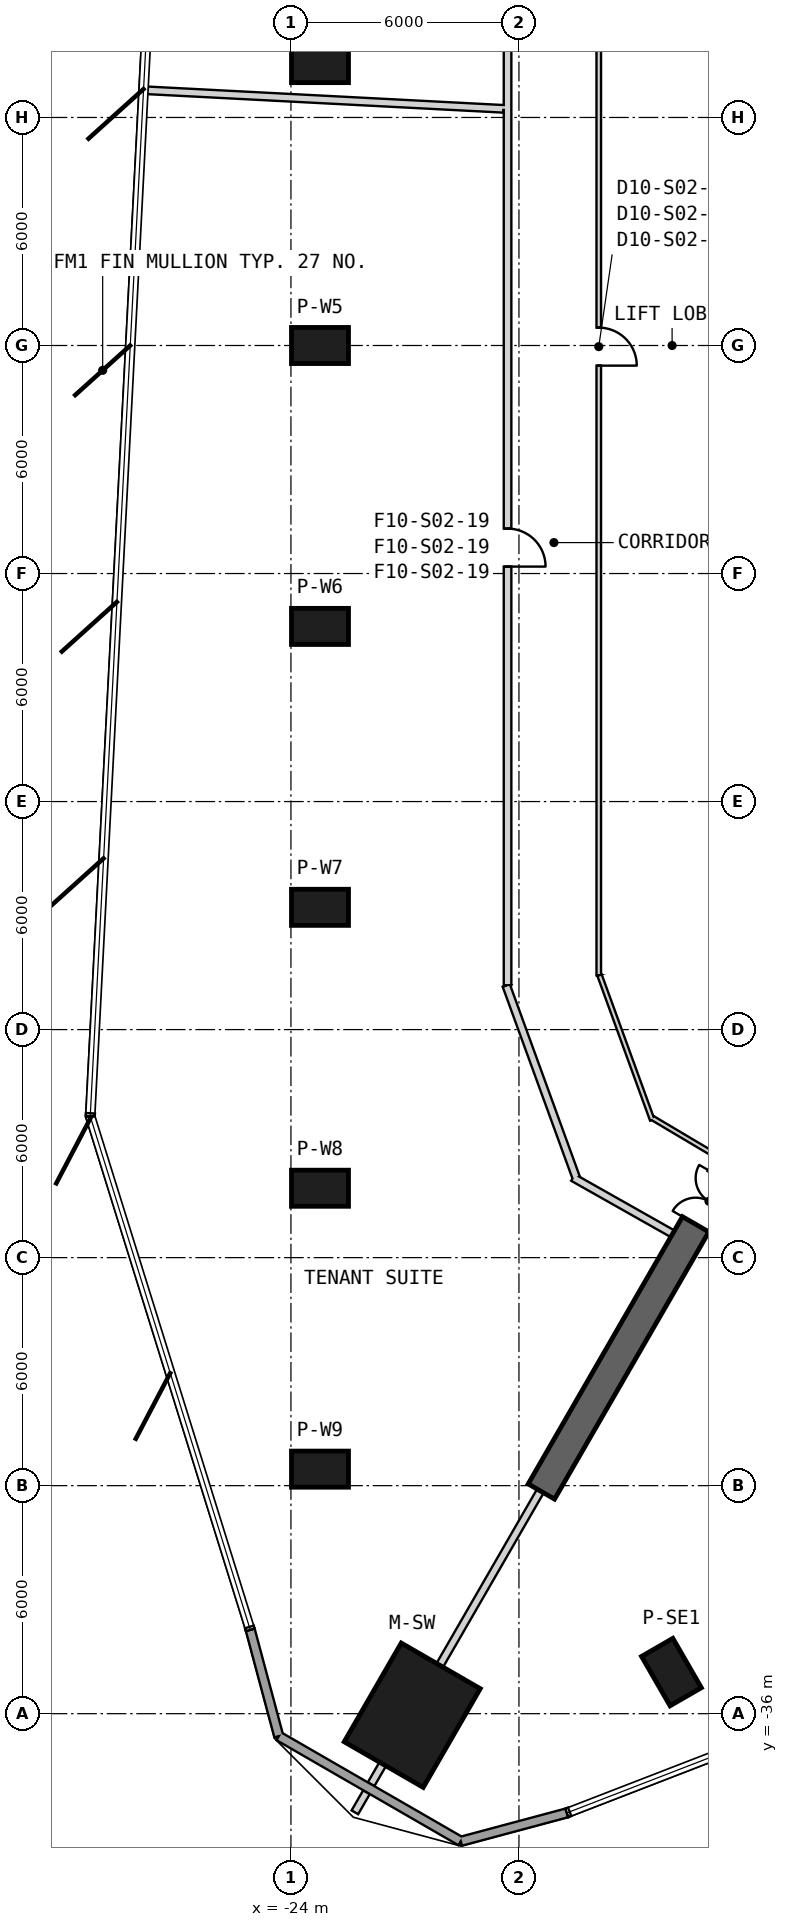
"""IFC4 building model, lengths in metres.
Left out: names, types, materials, properties, quantities, classifications, styles, units other than length and angle.
Written with IfcOpenShell. Run it as: python <this file> out.ifc"""

import sys

from ifc_helpers import new_model, si_unit, direction, frame, frame_2d, origin, origin_2d, place, context, subcontext, project, spatial, rectangle, extrude, element, fill, save


model = new_model("IFC4")
c1 = context("Model", 3, precision=1e-05, world=origin(), true_north=direction((0.0, 1.0)))
c2 = subcontext(c1, "Body", "Model", "MODEL_VIEW")
j1 = project(units=[si_unit("LENGTHUNIT", "METRE"), si_unit("PLANEANGLEUNIT", "RADIAN")], contexts=[c1])
p1 = place(None, origin())
s1 = spatial("IfcSite", under=j1, at=p1, CompositionType="ELEMENT")
p2 = place(p1, origin())
s2 = spatial("IfcBuilding", under=s1, at=p2, CompositionType="ELEMENT")
p3 = place(p2, frame((0.0, 0.0, 70.1)))
s3 = spatial("IfcBuildingStorey", under=s2, at=p3, CompositionType="ELEMENT", Elevation=70.1)
p4 = place(p3, frame((-20.808, -36.041, 0.0), z_axis=(0.0, 0.0, 1.0), x_axis=(-0.5, -0.866025403784, 0.0)))
e1 = element("IfcColumn", 1, at=p4, inside=s3, PredefinedType="COLUMN", context=c2, shape_type="SweptSolid", body=[
    extrude(rectangle(XDim=3.0, YDim=2.4, at=origin_2d()), origin(), (0.0, 0.0, 1.0), 4.1),
])
for number, where, z_axis, x_axis in (
    (2, (-23.236, 7.391, 0.0), (0.0, 0.0, 1.0), (-1.0, 0.0, 0.0)),
    (3, (-23.236, 0.0, 0.0), (0.0, 0.0, 1.0), (-1.0, 0.0, 0.0)),
    (4, (-23.236, -7.391, 0.0), (0.0, 0.0, 1.0), (-1.0, 0.0, 0.0)),
    (5, (-23.236, -14.783, 0.0), (0.0, 0.0, 1.0), (-1.0, 0.0, 0.0)),
    (6, (-23.236, -22.174, 0.0), (0.0, 0.0, 1.0), (-1.0, 0.0, 0.0)),
    (7, (-23.236, -29.566, 0.0), (0.0, 0.0, 1.0), (-1.0, 0.0, 0.0)),
    (8, (-13.987, -34.906, 0.0), (0.0, 0.0, 1.0), (0.5, -0.866, 0.0)),
):
    element("IfcColumn", number, at=place(p3, frame(where, z_axis=z_axis, x_axis=x_axis)), inside=s3, PredefinedType="COLUMN", context=c2, shape_type="SweptSolid", body=[
        extrude(rectangle(XDim=1.5, YDim=0.95, at=origin_2d()), origin(), (0.0, 0.0, 1.0), 4.1),
    ])
p5 = place(p3, frame((-10.575, -18.316, 0.0), z_axis=(0.0, 0.0, 1.0), x_axis=(-0.499998162141, -0.86602646487, 0.0)))
e9 = element("IfcWall", 9, at=p5, inside=s3, PredefinedType="SHEAR", context=c2, shape_type="SweptSolid", body=[
    extrude(rectangle(XDim=13.669, YDim=0.8, at=frame_2d((6.835, 0.0))), origin(), (0.0, 0.0, 1.0), 4.1),
])
p6 = place(p5, frame((4.15, 0.0, 0.0)))
e10 = element("IfcOpeningElement", 10, at=p6, cuts=e9, PredefinedType="OPENING", context=c2, shape_type="SweptSolid", body=[
    extrude(rectangle(XDim=1.4, YDim=2.4, at=frame_2d((0.7, 1.2))), frame((0.0, 0.41, 0.0), z_axis=(0.0, -1.0, 0.0), x_axis=(1.0, 0.0, 0.0)), (0.0, 0.0, 1.0), 0.82),
])
p7 = place(p3, frame((-25.07, -33.794, 0.0), z_axis=(0.0, 0.0, 1.0), x_axis=(0.258837161991, -0.965920971701, 0.0)))
e11 = element("IfcWall", 11, at=p7, inside=s3, PredefinedType="SOLIDWALL", context=c2, shape_type="SweptSolid", body=[
    extrude(rectangle(XDim=2.897, YDim=0.24, at=frame_2d((1.449, 0.0))), origin(), (0.0, 0.0, 1.0), 3.8),
])
p8 = place(p3, frame((-24.32, -36.593, 0.0), z_axis=(0.0, 0.0, 1.0), x_axis=(0.866017993231, -0.500012835235, 0.0)))
e12 = element("IfcWall", 12, at=p8, inside=s3, PredefinedType="SOLIDWALL", context=c2, shape_type="SweptSolid", body=[
    extrude(rectangle(XDim=5.531, YDim=0.24, at=frame_2d((2.766, 0.0))), origin(), (0.0, 0.0, 1.0), 3.8),
])
p9 = place(p3, frame((-19.53, -39.359, 0.0), z_axis=(0.0, 0.0, 1.0), x_axis=(0.965912964575, 0.258867040904, 0.0)))
e13 = element("IfcWall", 13, at=p9, inside=s3, PredefinedType="SOLIDWALL", context=c2, shape_type="SweptSolid", body=[
    extrude(rectangle(XDim=2.889, YDim=0.24, at=frame_2d((1.444, 0.0))), origin(), (0.0, 0.0, 1.0), 3.8),
])
p10 = place(p3, frame((-15.9, 16.451, 0.0), z_axis=(0.0, 0.0, 1.0), x_axis=(0.0, -1.0, 0.0)))
e14 = element("IfcWall", 14, at=p10, inside=s3, PredefinedType="PARTITIONING", context=c2, shape_type="SweptSolid", body=[
    extrude(rectangle(XDim=33.022, YDim=0.12, at=frame_2d((16.511, 0.0))), origin(), (0.0, 0.0, 1.0), 2.98),
])
p11 = place(p10, frame((15.981, 0.0, 0.0)))
e15 = element("IfcOpeningElement", 15, at=p11, cuts=e14, PredefinedType="OPENING", context=c2, shape_type="SweptSolid", body=[
    extrude(rectangle(XDim=1.0, YDim=2.1, at=frame_2d((0.5, 1.05))), frame((0.0, 0.07, 0.0), z_axis=(0.0, -1.0, 0.0), x_axis=(1.0, 0.0, 0.0)), (0.0, 0.0, 1.0), 0.14),
])
p12 = place(p3, frame((-15.879, -16.567, 0.0), z_axis=(0.0, 0.0, 1.0), x_axis=(0.341999322503, -0.939700198685, 0.0)))
e16 = element("IfcWall", 16, at=p12, inside=s3, PredefinedType="PARTITIONING", context=c2, shape_type="SweptSolid", body=[
    extrude(rectangle(XDim=4.054, YDim=0.12, at=frame_2d((2.027, 0.0))), origin(), (0.0, 0.0, 1.0), 2.88),
])
p13 = place(p3, frame((-14.494, -20.322, 0.0), z_axis=(0.0, 0.0, 1.0), x_axis=(0.859745408261, -0.510722853389, 0.0)))
e17 = element("IfcWall", 17, at=p13, inside=s3, PredefinedType="PARTITIONING", context=c2, shape_type="SweptSolid", body=[
    extrude(rectangle(XDim=1.991, YDim=0.12, at=frame_2d((0.996, 0.0))), origin(), (0.0, 0.0, 1.0), 3.8),
])
p14 = place(p3, frame((-16.576, -21.892, 0.0), z_axis=(0.0, 0.0, 1.0), x_axis=(0.870559817111, -0.492062602553, 0.0)))
e18 = element("IfcWall", 18, at=p14, inside=s3, PredefinedType="PARTITIONING", context=c2, shape_type="SweptSolid", body=[
    extrude(rectangle(XDim=3.01, YDim=0.2, at=frame_2d((1.505, 0.0))), origin(), (0.0, 0.0, 1.0), 3.8),
])
p15 = place(p3, frame((-18.334, -16.84, 0.0), z_axis=(0.0, 0.0, 1.0), x_axis=(0.342015877493, -0.939694173411, 0.0)))
e19 = element("IfcWall", 19, at=p15, inside=s3, PredefinedType="PARTITIONING", context=c2, shape_type="SweptSolid", body=[
    extrude(rectangle(XDim=5.389, YDim=0.2, at=frame_2d((2.694, 0.0))), origin(), (0.0, 0.0, 1.0), 2.88),
])
p16 = place(p3, frame((-18.3, 17.034, 0.0), z_axis=(0.0, 0.0, 1.0), x_axis=(0.0, -1.0, 0.0)))
e20 = element("IfcWall", 20, at=p16, inside=s3, PredefinedType="PARTITIONING", context=c2, shape_type="SweptSolid", body=[
    extrude(rectangle(XDim=10.835, YDim=0.2, at=frame_2d((5.417, 0.0))), origin(), (0.0, 0.0, 1.0), 3.08),
])
p17 = place(p16, frame((4.956, 0.0, 0.0)))
e21 = element("IfcOpeningElement", 21, at=p17, cuts=e20, PredefinedType="OPENING", context=c2, shape_type="SweptSolid", body=[
    extrude(rectangle(XDim=1.0, YDim=2.1, at=frame_2d((0.5, 1.05))), frame((0.0, 0.11, 0.0), z_axis=(0.0, -1.0, 0.0), x_axis=(1.0, 0.0, 0.0)), (0.0, 0.0, 1.0), 0.22),
])
p18 = place(p3, frame((-18.3, 6.199, 0.0), z_axis=(0.0, 0.0, 1.0), x_axis=(0.0, -1.0, 0.0)))
e22 = element("IfcWall", 22, at=p18, inside=s3, PredefinedType="PARTITIONING", context=c2, shape_type="SweptSolid", body=[
    extrude(rectangle(XDim=23.033, YDim=0.2, at=frame_2d((11.517, 0.0))), origin(), (0.0, 0.0, 1.0), 3.08),
])
p19 = place(p18, frame((11.017, 0.0, 0.0)))
e23 = element("IfcOpeningElement", 23, at=p19, cuts=e22, PredefinedType="OPENING", context=c2, shape_type="SweptSolid", body=[
    extrude(rectangle(XDim=1.0, YDim=2.1, at=frame_2d((0.5, 1.05))), frame((0.0, 0.11, 0.0), z_axis=(0.0, -1.0, 0.0), x_axis=(1.0, 0.0, 0.0)), (0.0, 0.0, 1.0), 0.22),
])
p20 = place(p3, frame((-18.4, 6.227, 0.0), z_axis=(0.0, 0.0, 1.0), x_axis=(-0.998654739652, 0.051852781702, 0.0)))
e24 = element("IfcWall", 24, at=p20, inside=s3, PredefinedType="PARTITIONING", context=c2, shape_type="SweptSolid", body=[
    extrude(rectangle(XDim=9.492, YDim=0.2, at=frame_2d((4.746, 0.0))), origin(), (0.0, 0.0, 1.0), 3.08),
])
p21 = place(p3, frame((-22.318, -38.596, 0.0), z_axis=(0.0, 0.0, 1.0), x_axis=(0.500078582497, 0.865980029404, 0.0)))
e25 = element("IfcWall", 25, at=p21, inside=s3, PredefinedType="PARTITIONING", context=c2, shape_type="SweptSolid", body=[
    extrude(rectangle(XDim=0.613, YDim=0.2, at=frame_2d((0.307, 0.0))), origin(), (0.0, 0.0, 1.0), 3.8),
])
p22 = place(p3, frame((-21.891, -37.857, 0.0), z_axis=(0.0, 0.0, 1.0), x_axis=(0.49994015576, 0.866059952115, 0.0)))
e26 = element("IfcWall", 26, at=p22, inside=s3, PredefinedType="PARTITIONING", context=c2, shape_type="SweptSolid", body=[
    extrude(rectangle(XDim=0.615, YDim=0.2, at=frame_2d((0.307, 0.0))), origin(), (0.0, 0.0, 1.0), 3.8),
])
p23 = place(p3, frame((-20.084, -34.727, 0.0), z_axis=(0.0, 0.0, 1.0), x_axis=(0.499991120112, 0.86603053053, 0.0)))
e27 = element("IfcWall", 27, at=p23, inside=s3, PredefinedType="PARTITIONING", context=c2, shape_type="SweptSolid", body=[
    extrude(rectangle(XDim=5.296, YDim=0.2, at=frame_2d((2.648, 0.0))), origin(), (0.0, 0.0, 1.0), 3.37),
])
p24 = place(p11, origin())
e28 = element("IfcDoor", 28, at=p24, inside=s3, OperationType="SINGLE_SWING_RIGHT", PredefinedType="NOTDEFINED", context=c2, shape_type="SweptSolid", body=[
    extrude(rectangle(XDim=1.0, YDim=2.1, at=frame_2d((0.5, 1.05))), frame((0.0, 0.025, 0.0), z_axis=(0.0, -1.0, 0.0), x_axis=(1.0, 0.0, 0.0)), (0.0, 0.0, 1.0), 0.05),
])
fill(e15, e28)
p25 = place(p19, origin())
e29 = element("IfcDoor", 29, at=p25, inside=s3, OperationType="SINGLE_SWING_LEFT", PredefinedType="USERDEFINED", context=c2, shape_type="SweptSolid", body=[
    extrude(rectangle(XDim=1.0, YDim=2.1, at=frame_2d((0.5, 1.05))), frame((0.0, 0.025, 0.0), z_axis=(0.0, -1.0, 0.0), x_axis=(1.0, 0.0, 0.0)), (0.0, 0.0, 1.0), 0.05),
])
fill(e23, e29)
p26 = place(p6, origin())
e30 = element("IfcDoor", 30, at=p26, inside=s3, OperationType="DOUBLE_DOOR_SINGLE_SWING", PredefinedType="NOTDEFINED", context=c2, shape_type="SweptSolid", body=[
    extrude(rectangle(XDim=1.4, YDim=2.4, at=frame_2d((0.7, 1.2))), frame((0.0, 0.025, 0.0), z_axis=(0.0, -1.0, 0.0), x_axis=(1.0, 0.0, 0.0)), (0.0, 0.0, 1.0), 0.05),
])
fill(e10, e30)
save(model, sys.argv[1])
